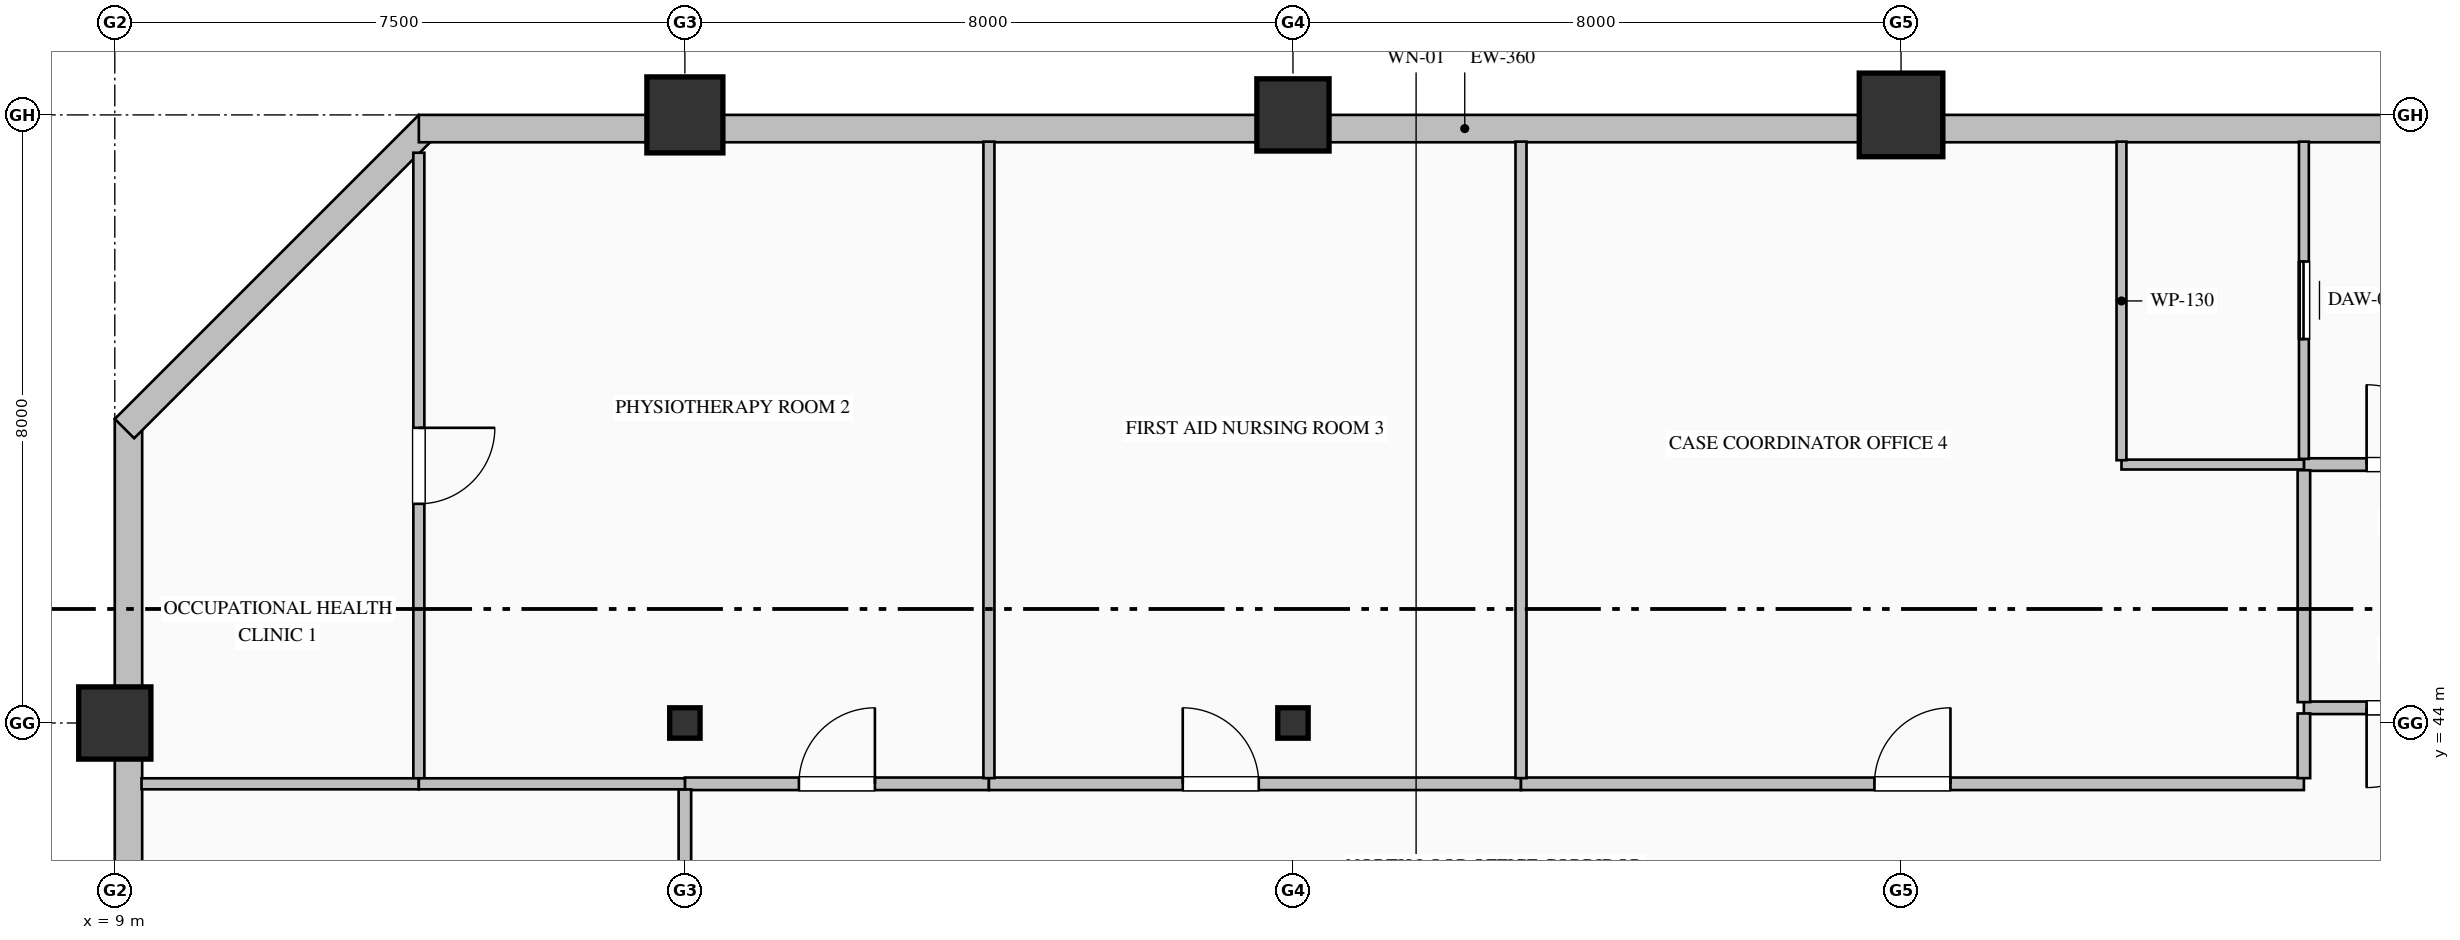
"""IFC4 building model, lengths in metres.
Left out: names, types, materials, properties, quantities, classifications, styles, units other than length and angle.
Written with IfcOpenShell. Run it as: python <this file> out.ifc"""

import sys

from ifc_helpers import new_model, si_unit, direction, frame, frame_2d, origin, origin_2d, place, context, subcontext, project, spatial, rectangle, hollow_rectangle, hollow_circle, i_section, extrude, element, fill, save


model = new_model("IFC4")
c1 = context("Model", 3, precision=1e-05, world=origin(), true_north=direction((0.0, 1.0)))
c2 = subcontext(c1, "Body", "Model", "MODEL_VIEW")
j1 = project(units=[si_unit("LENGTHUNIT", "METRE"), si_unit("PLANEANGLEUNIT", "RADIAN")], contexts=[c1])
p1 = place(None, origin())
s1 = spatial("IfcSite", under=j1, at=p1, CompositionType="ELEMENT")
p2 = place(p1, origin())
s2 = spatial("IfcBuilding", under=s1, at=p2, CompositionType="ELEMENT")
p3 = place(p2, frame((0.0, 0.0, 167.0)))
s3 = spatial("IfcBuildingStorey", under=s2, at=p3, CompositionType="ELEMENT", Elevation=167.0)
p4 = place(p3, frame((9.0, 44.0, 0.0), z_axis=(0.0, 0.0, 1.0), x_axis=(1.0, 0.0, 0.0)))
e1 = element("IfcColumn", 1, at=p4, inside=s3, PredefinedType="COLUMN", context=c2, shape_type="SweptSolid", body=[
    extrude(hollow_rectangle(XDim=0.95, YDim=0.95, WallThickness=0.036, at=origin_2d()), origin(), (0.0, 0.0, 1.0), 4.0),
])
p5 = place(p3, frame((16.5, 44.0, 0.0), z_axis=(0.0, 0.0, 1.0), x_axis=(1.0, 0.0, 0.0)))
e2 = element("IfcColumn", 2, at=p5, inside=s3, PredefinedType="COLUMN", context=c2, shape_type="SweptSolid", body=[
    extrude(i_section(OverallWidth=0.4, OverallDepth=0.4, WebThickness=0.013, FlangeThickness=0.021, FilletRadius=0.022, at=origin_2d()), origin(), (0.0, 0.0, 1.0), 4.0),
])
p6 = place(p3, frame((16.5, 52.0, 0.0), z_axis=(0.0, 0.0, 1.0), x_axis=(1.0, 0.0, 0.0)))
e3 = element("IfcColumn", 3, at=p6, inside=s3, PredefinedType="COLUMN", context=c2, shape_type="SweptSolid", body=[
    extrude(hollow_circle(Radius=0.5, WallThickness=0.036, at=origin_2d()), origin(), (0.0, 0.0, 1.0), 4.0),
])
p7 = place(p3, frame((24.5, 44.0, 0.0), z_axis=(0.0, 0.0, 1.0), x_axis=(1.0, 0.0, 0.0)))
e4 = element("IfcColumn", 4, at=p7, inside=s3, PredefinedType="COLUMN", context=c2, shape_type="SweptSolid", body=[
    extrude(i_section(OverallWidth=0.4, OverallDepth=0.4, WebThickness=0.013, FlangeThickness=0.021, FilletRadius=0.022, at=origin_2d()), origin(), (0.0, 0.0, 1.0), 4.0),
])
p8 = place(p3, frame((24.5, 52.0, 0.0), z_axis=(0.0, 0.0, 1.0), x_axis=(1.0, 0.0, 0.0)))
e5 = element("IfcColumn", 5, at=p8, inside=s3, PredefinedType="COLUMN", context=c2, shape_type="SweptSolid", body=[
    extrude(hollow_rectangle(XDim=0.95, YDim=0.95, WallThickness=0.036, at=origin_2d()), origin(), (0.0, 0.0, 1.0), 4.0),
])
p9 = place(p3, frame((32.5, 52.0, 0.0), z_axis=(0.0, 0.0, 1.0), x_axis=(1.0, 0.0, 0.0)))
e6 = element("IfcColumn", 6, at=p9, inside=s3, PredefinedType="COLUMN", context=c2, shape_type="SweptSolid", body=[
    extrude(hollow_rectangle(XDim=1.1, YDim=1.1, WallThickness=0.04, at=origin_2d()), origin(), (0.0, 0.0, 1.0), 4.0),
])
p10 = place(p3, frame((9.18, 32.0, 0.0), z_axis=(0.0, 0.0, 1.0), x_axis=(0.0, 1.0, 0.0)))
e7 = element("IfcWall", 7, at=p10, inside=s3, PredefinedType="SOLIDWALL", context=c2, shape_type="SweptSolid", body=[
    extrude(rectangle(XDim=16.0, YDim=0.36, at=frame_2d((8.0, 0.0))), origin(), (0.0, 0.0, 1.0), 3.265),
])
p11 = place(p10, frame((6.6, 0.0, 0.7)))
e8 = element("IfcOpeningElement", 8, at=p11, cuts=e7, PredefinedType="OPENING", context=c2, shape_type="SweptSolid", body=[
    extrude(rectangle(XDim=1.2, YDim=1.85, at=frame_2d((0.6, 0.925))), frame((0.0, 0.19, 0.0), z_axis=(0.0, -1.0, 0.0), x_axis=(1.0, 0.0, 0.0)), (0.0, 0.0, 1.0), 0.38),
])
p12 = place(p3, frame((9.127, 47.873, 0.0), z_axis=(0.0, 0.0, 1.0), x_axis=(0.707106781187, 0.707106781187, 0.0)))
e9 = element("IfcWall", 9, at=p12, inside=s3, PredefinedType="SOLIDWALL", context=c2, shape_type="SweptSolid", body=[
    extrude(rectangle(XDim=5.657, YDim=0.36, at=frame_2d((2.828, 0.0))), origin(), (0.0, 0.0, 1.0), 3.765),
])
p13 = place(p3, frame((13.0, 51.82, 0.0), z_axis=(0.0, 0.0, 1.0), x_axis=(1.0, 0.0, 0.0)))
e10 = element("IfcWall", 10, at=p13, inside=s3, PredefinedType="SOLIDWALL", context=c2, shape_type="SweptSolid", body=[
    extrude(rectangle(XDim=27.52, YDim=0.36, at=frame_2d((13.76, 0.0))), origin(), (0.0, 0.0, 1.0), 3.265),
])
p14 = place(p3, frame((37.8, 47.4, 0.0), z_axis=(0.0, 0.0, 1.0), x_axis=(1.0, 0.0, 0.0)))
e11 = element("IfcWall", 11, at=p14, inside=s3, PredefinedType="PARTITIONING", context=c2, shape_type="SweptSolid", body=[
    extrude(rectangle(XDim=2.7, YDim=0.165, at=frame_2d((1.35, 0.0))), origin(), (0.0, 0.0, 1.0), 3.765),
])
p15 = place(p14, frame((0.825, 0.0, 0.0)))
e12 = element("IfcOpeningElement", 12, at=p15, cuts=e11, PredefinedType="OPENING", context=c2, shape_type="SweptSolid", body=[
    extrude(rectangle(XDim=1.05, YDim=2.15, at=frame_2d((0.525, 1.075))), frame((0.0, 0.093, 0.0), z_axis=(0.0, -1.0, 0.0), x_axis=(1.0, 0.0, 0.0)), (0.0, 0.0, 1.0), 0.185),
])
p16 = place(p3, frame((40.5, 44.2, 0.0), z_axis=(0.0, 0.0, 1.0), x_axis=(-1.0, 0.0, 0.0)))
e13 = element("IfcWall", 13, at=p16, inside=s3, PredefinedType="PARTITIONING", context=c2, shape_type="SweptSolid", body=[
    extrude(rectangle(XDim=2.7, YDim=0.165, at=frame_2d((1.35, 0.0))), origin(), (0.0, 0.0, 1.0), 3.765),
])
p17 = place(p16, frame((0.825, 0.0, 0.0)))
e14 = element("IfcOpeningElement", 14, at=p17, cuts=e13, PredefinedType="OPENING", context=c2, shape_type="SweptSolid", body=[
    extrude(rectangle(XDim=1.05, YDim=2.15, at=frame_2d((0.525, 1.075))), frame((0.0, 0.093, 0.0), z_axis=(0.0, -1.0, 0.0), x_axis=(1.0, 0.0, 0.0)), (0.0, 0.0, 1.0), 0.185),
])
p18 = place(p3, frame((37.8, 44.274, 0.0), z_axis=(0.0, 0.0, 1.0), x_axis=(0.0, 1.0, 0.0)))
e15 = element("IfcWall", 15, at=p18, inside=s3, PredefinedType="PARTITIONING", context=c2, shape_type="SweptSolid", body=[
    extrude(rectangle(XDim=3.051, YDim=0.165, at=frame_2d((1.525, 0.0))), origin(), (0.0, 0.0, 1.0), 3.765),
])
p19 = place(p3, frame((37.8, 47.475, 0.0), z_axis=(0.0, 0.0, 1.0), x_axis=(0.0, 1.0, 0.0)))
e16 = element("IfcWall", 16, at=p19, inside=s3, PredefinedType="PARTITIONING", context=c2, shape_type="SweptSolid", body=[
    extrude(rectangle(XDim=4.173, YDim=0.13, at=frame_2d((2.087, 0.0))), origin(), (0.0, 0.0, 1.0), 3.765),
])
p20 = place(p19, frame((1.577, 0.0, 0.0)))
e17 = element("IfcOpeningElement", 17, at=p20, cuts=e16, PredefinedType="OPENING", context=c2, shape_type="SweptSolid", body=[
    extrude(rectangle(XDim=1.02, YDim=2.15, at=frame_2d((0.51, 1.075))), frame((0.0, 0.075, 0.0), z_axis=(0.0, -1.0, 0.0), x_axis=(1.0, 0.0, 0.0)), (0.0, 0.0, 1.0), 0.15),
])
p21 = place(p3, frame((37.8, 47.4, 0.0), z_axis=(0.0, 0.0, 1.0), x_axis=(-1.0, 0.0, 0.0)))
e18 = element("IfcWall", 18, at=p21, inside=s3, PredefinedType="PARTITIONING", context=c2, shape_type="SweptSolid", body=[
    extrude(rectangle(XDim=2.4, YDim=0.13, at=frame_2d((1.2, 0.0))), origin(), (0.0, 0.0, 1.0), 3.765),
])
p22 = place(p3, frame((35.4, 47.457, 0.0), z_axis=(0.0, 0.0, 1.0), x_axis=(0.0, 1.0, 0.0)))
e19 = element("IfcWall", 19, at=p22, inside=s3, PredefinedType="PARTITIONING", context=c2, shape_type="SweptSolid", body=[
    extrude(rectangle(XDim=4.191, YDim=0.13, at=frame_2d((2.095, 0.0))), origin(), (0.0, 0.0, 1.0), 3.765),
])
p23 = place(p3, frame((16.5, 43.2, 0.0), z_axis=(0.0, 0.0, 1.0), x_axis=(1.0, 0.0, 0.0)))
e20 = element("IfcWall", 20, at=p23, inside=s3, PredefinedType="PARTITIONING", context=c2, shape_type="SweptSolid", body=[
    extrude(rectangle(XDim=4.0, YDim=0.165, at=frame_2d((2.0, 0.0))), origin(), (0.0, 0.0, 1.0), 3.765),
])
p24 = place(p23, frame((1.5, 0.0, 0.0)))
e21 = element("IfcOpeningElement", 21, at=p24, cuts=e20, PredefinedType="OPENING", context=c2, shape_type="SweptSolid", body=[
    extrude(rectangle(XDim=1.0, YDim=2.15, at=frame_2d((0.5, 1.075))), frame((0.0, 0.093, 0.0), z_axis=(0.0, -1.0, 0.0), x_axis=(1.0, 0.0, 0.0)), (0.0, 0.0, 1.0), 0.185),
])
p25 = place(p3, frame((20.5, 43.2, 0.0), z_axis=(0.0, 0.0, 1.0), x_axis=(1.0, 0.0, 0.0)))
e22 = element("IfcWall", 22, at=p25, inside=s3, PredefinedType="PARTITIONING", context=c2, shape_type="SweptSolid", body=[
    extrude(rectangle(XDim=7.0, YDim=0.165, at=frame_2d((3.5, 0.0))), origin(), (0.0, 0.0, 1.0), 3.765),
])
p26 = place(p25, frame((2.55, 0.0, 0.0)))
e23 = element("IfcOpeningElement", 23, at=p26, cuts=e22, PredefinedType="OPENING", context=c2, shape_type="SweptSolid", body=[
    extrude(rectangle(XDim=1.0, YDim=2.15, at=frame_2d((0.5, 1.075))), frame((0.0, 0.093, 0.0), z_axis=(0.0, -1.0, 0.0), x_axis=(1.0, 0.0, 0.0)), (0.0, 0.0, 1.0), 0.185),
])
p27 = place(p3, frame((27.5, 43.2, 0.0), z_axis=(0.0, 0.0, 1.0), x_axis=(1.0, 0.0, 0.0)))
e24 = element("IfcWall", 24, at=p27, inside=s3, PredefinedType="PARTITIONING", context=c2, shape_type="SweptSolid", body=[
    extrude(rectangle(XDim=10.3, YDim=0.165, at=frame_2d((5.15, 0.0))), origin(), (0.0, 0.0, 1.0), 3.765),
])
p28 = place(p27, frame((4.65, 0.0, 0.0)))
e25 = element("IfcOpeningElement", 25, at=p28, cuts=e24, PredefinedType="OPENING", context=c2, shape_type="SweptSolid", body=[
    extrude(rectangle(XDim=1.0, YDim=2.15, at=frame_2d((0.5, 1.075))), frame((0.0, 0.093, 0.0), z_axis=(0.0, -1.0, 0.0), x_axis=(1.0, 0.0, 0.0)), (0.0, 0.0, 1.0), 0.185),
])
p29 = place(p3, frame((16.5, 41.0, 0.0), z_axis=(0.0, 0.0, 1.0), x_axis=(0.0, 1.0, 0.0)))
e26 = element("IfcWall", 26, at=p29, inside=s3, PredefinedType="PARTITIONING", context=c2, shape_type="SweptSolid", body=[
    extrude(rectangle(XDim=2.125, YDim=0.165, at=frame_2d((1.063, 0.0))), origin(), (0.0, 0.0, 1.0), 3.157),
])
p30 = place(p3, frame((37.8, 43.274, 0.0), z_axis=(0.0, 0.0, 1.0), x_axis=(0.0, 1.0, 0.0)))
e27 = element("IfcWall", 27, at=p30, inside=s3, PredefinedType="PARTITIONING", context=c2, shape_type="SweptSolid", body=[
    extrude(rectangle(XDim=0.851, YDim=0.165, at=frame_2d((0.426, 0.0))), origin(), (0.0, 0.0, 1.0), 3.765),
])
p31 = place(p3, frame((13.0, 51.502, 0.0), z_axis=(0.0, 0.0, 1.0), x_axis=(0.0, -1.0, 0.0)))
e28 = element("IfcWall", 28, at=p31, inside=s3, PredefinedType="PARTITIONING", context=c2, shape_type="SweptSolid", body=[
    extrude(rectangle(XDim=8.238, YDim=0.145, at=frame_2d((4.119, 0.0))), origin(), (0.0, 0.0, 1.0), 3.765),
])
p32 = place(p31, frame((3.619, 0.0, 0.0)))
e29 = element("IfcOpeningElement", 29, at=p32, cuts=e28, PredefinedType="OPENING", context=c2, shape_type="SweptSolid", body=[
    extrude(rectangle(XDim=1.0, YDim=2.15, at=frame_2d((0.5, 1.075))), frame((0.0, 0.083, 0.0), z_axis=(0.0, -1.0, 0.0), x_axis=(1.0, 0.0, 0.0)), (0.0, 0.0, 1.0), 0.165),
])
p33 = place(p3, frame((13.0, 43.2, 0.0), z_axis=(0.0, 0.0, 1.0), x_axis=(-1.0, 0.0, 0.0)))
e30 = element("IfcWall", 30, at=p33, inside=s3, PredefinedType="PARTITIONING", context=c2, shape_type="SweptSolid", body=[
    extrude(rectangle(XDim=3.648, YDim=0.145, at=frame_2d((1.824, 0.0))), origin(), (0.0, 0.0, 1.0), 3.765),
])
p34 = place(p3, frame((20.5, 51.648, 0.0), z_axis=(0.0, 0.0, 1.0), x_axis=(0.0, -1.0, 0.0)))
e31 = element("IfcWall", 31, at=p34, inside=s3, PredefinedType="PARTITIONING", context=c2, shape_type="SweptSolid", body=[
    extrude(rectangle(XDim=8.374, YDim=0.145, at=frame_2d((4.187, 0.0))), origin(), (0.0, 0.0, 1.0), 3.765),
])
p35 = place(p3, frame((16.5, 43.2, 0.0), z_axis=(0.0, 0.0, 1.0), x_axis=(-1.0, 0.0, 0.0)))
e32 = element("IfcWall", 32, at=p35, inside=s3, PredefinedType="PARTITIONING", context=c2, shape_type="SweptSolid", body=[
    extrude(rectangle(XDim=3.5, YDim=0.145, at=frame_2d((1.75, 0.0))), origin(), (0.0, 0.0, 1.0), 3.765),
])
p36 = place(p3, frame((27.5, 51.648, 0.0), z_axis=(0.0, 0.0, 1.0), x_axis=(0.0, -1.0, 0.0)))
e33 = element("IfcWall", 33, at=p36, inside=s3, PredefinedType="PARTITIONING", context=c2, shape_type="SweptSolid", body=[
    extrude(rectangle(XDim=8.374, YDim=0.145, at=frame_2d((4.187, 0.0))), origin(), (0.0, 0.0, 1.0), 3.765),
])
p37 = place(p15, origin())
e34 = element("IfcDoor", 34, at=p37, inside=s3, OperationType="SINGLE_SWING_LEFT", PredefinedType="DOOR", context=c2, shape_type="SweptSolid", body=[
    extrude(rectangle(XDim=1.05, YDim=2.15, at=frame_2d((0.525, 1.075))), frame((0.0, 0.025, 0.0), z_axis=(0.0, -1.0, 0.0), x_axis=(1.0, 0.0, 0.0)), (0.0, 0.0, 1.0), 0.05),
])
fill(e12, e34)
p38 = place(p17, origin())
e35 = element("IfcDoor", 35, at=p38, inside=s3, OperationType="SINGLE_SWING_RIGHT", PredefinedType="DOOR", context=c2, shape_type="SweptSolid", body=[
    extrude(rectangle(XDim=1.05, YDim=2.15, at=frame_2d((0.525, 1.075))), frame((0.0, 0.025, 0.0), z_axis=(0.0, -1.0, 0.0), x_axis=(1.0, 0.0, 0.0)), (0.0, 0.0, 1.0), 0.05),
])
fill(e14, e35)
p39 = place(p20, origin())
e36 = element("IfcDoor", 36, at=p39, inside=s3, OperationType="SLIDING_TO_LEFT", PredefinedType="DOOR", context=c2, shape_type="SweptSolid", body=[
    extrude(rectangle(XDim=1.02, YDim=2.15, at=frame_2d((0.51, 1.075))), frame((0.0, 0.025, 0.0), z_axis=(0.0, -1.0, 0.0), x_axis=(1.0, 0.0, 0.0)), (0.0, 0.0, 1.0), 0.05),
])
fill(e17, e36)
p40 = place(p32, origin())
e37 = element("IfcDoor", 37, at=p40, inside=s3, OperationType="SINGLE_SWING_LEFT", PredefinedType="DOOR", context=c2, shape_type="SweptSolid", body=[
    extrude(rectangle(XDim=1.0, YDim=2.15, at=frame_2d((0.5, 1.075))), frame((0.0, 0.025, 0.0), z_axis=(0.0, -1.0, 0.0), x_axis=(1.0, 0.0, 0.0)), (0.0, 0.0, 1.0), 0.05),
])
fill(e29, e37)
p41 = place(p24, origin())
e38 = element("IfcDoor", 38, at=p41, inside=s3, OperationType="SINGLE_SWING_RIGHT", PredefinedType="DOOR", context=c2, shape_type="SweptSolid", body=[
    extrude(rectangle(XDim=1.0, YDim=2.15, at=frame_2d((0.5, 1.075))), frame((0.0, 0.025, 0.0), z_axis=(0.0, -1.0, 0.0), x_axis=(1.0, 0.0, 0.0)), (0.0, 0.0, 1.0), 0.05),
])
fill(e21, e38)
p42 = place(p26, origin())
e39 = element("IfcDoor", 39, at=p42, inside=s3, OperationType="SINGLE_SWING_LEFT", PredefinedType="DOOR", context=c2, shape_type="SweptSolid", body=[
    extrude(rectangle(XDim=1.0, YDim=2.15, at=frame_2d((0.5, 1.075))), frame((0.0, 0.025, 0.0), z_axis=(0.0, -1.0, 0.0), x_axis=(1.0, 0.0, 0.0)), (0.0, 0.0, 1.0), 0.05),
])
fill(e23, e39)
p43 = place(p28, origin())
e40 = element("IfcDoor", 40, at=p43, inside=s3, OperationType="SINGLE_SWING_RIGHT", PredefinedType="DOOR", context=c2, shape_type="SweptSolid", body=[
    extrude(rectangle(XDim=1.0, YDim=2.15, at=frame_2d((0.5, 1.075))), frame((0.0, 0.025, 0.0), z_axis=(0.0, -1.0, 0.0), x_axis=(1.0, 0.0, 0.0)), (0.0, 0.0, 1.0), 0.05),
])
fill(e25, e40)
save(model, sys.argv[1])
